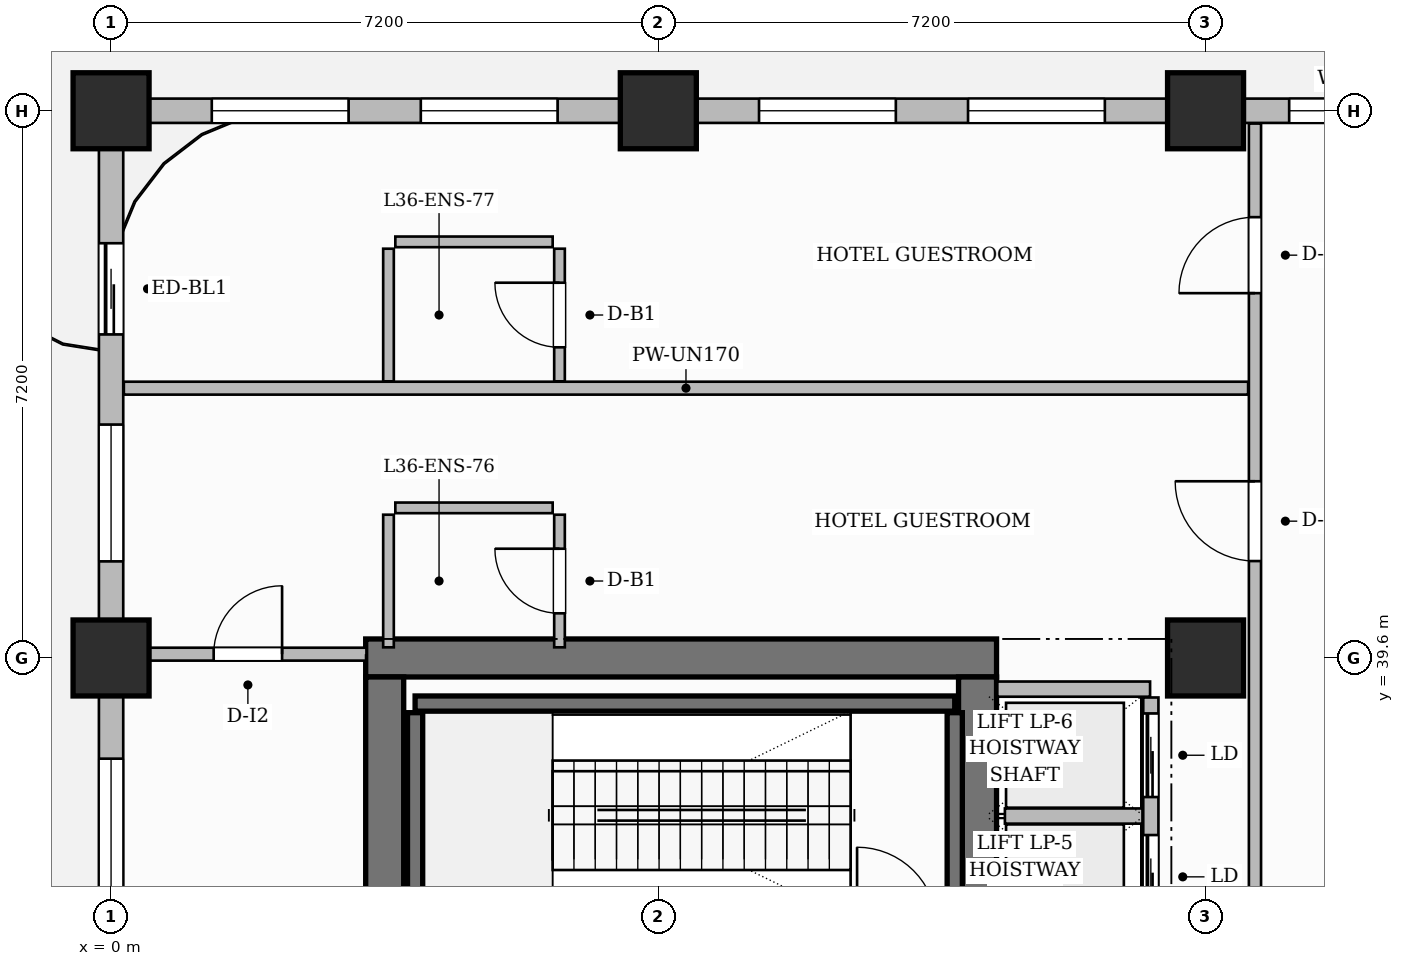
"""IFC4 building model, lengths in metres.
Left out: names, types, materials, properties, quantities, classifications, styles, units other than length and angle.
Written with IfcOpenShell. Run it as: python <this file> out.ifc"""

import sys

from ifc_helpers import new_model, si_unit, direction, frame, frame_2d, origin, origin_2d, place, context, subcontext, project, spatial, rectangle, extrude, source, transform, mapped, element, fill, save


model = new_model("IFC4")
c1 = context("Model", 3, precision=1e-05, world=origin(), true_north=direction((0.0, 1.0)))
c2 = subcontext(c1, "Body", "Model", "MODEL_VIEW")
j1 = project(units=[si_unit("LENGTHUNIT", "METRE"), si_unit("PLANEANGLEUNIT", "RADIAN")], contexts=[c1])
p1 = place(None, origin())
s1 = spatial("IfcSite", under=j1, at=p1, CompositionType="ELEMENT")
p2 = place(p1, origin())
s2 = spatial("IfcBuilding", under=s1, at=p2, CompositionType="ELEMENT")
p3 = place(p2, frame((0.0, 0.0, 145.1)))
s3 = spatial("IfcBuildingStorey", under=s2, at=p3, CompositionType="ELEMENT", Elevation=145.1)
p4 = place(p3, frame((3.35, 39.6, 0.0), z_axis=(0.0, 0.0, 1.0), x_axis=(1.0, 0.0, 0.0)))
e1 = element("IfcWall", 1, at=p4, inside=s3, PredefinedType="SHEAR", context=c2, shape_type="SweptSolid", body=[
    extrude(rectangle(XDim=8.3, YDim=0.5, at=frame_2d((4.15, 0.0))), origin(), (0.0, 0.0, 1.0), 5.2),
])
p5 = place(p3, frame((3.6, 25.45, 0.0), z_axis=(0.0, 0.0, 1.0), x_axis=(0.0, 1.0, 0.0)))
e2 = element("IfcWall", 2, at=p5, inside=s3, PredefinedType="SHEAR", context=c2, shape_type="SweptSolid", body=[
    extrude(rectangle(XDim=13.9, YDim=0.5, at=frame_2d((6.95, 0.0))), origin(), (0.0, 0.0, 1.0), 5.2),
])
p6 = place(p3, frame((11.4, 25.45, 0.0), z_axis=(0.0, 0.0, 1.0), x_axis=(0.0, 1.0, 0.0)))
e3 = element("IfcWall", 3, at=p6, inside=s3, PredefinedType="SHEAR", context=c2, shape_type="SweptSolid", body=[
    extrude(rectangle(XDim=13.9, YDim=0.5, at=frame_2d((6.95, 0.0))), origin(), (0.0, 0.0, 1.0), 5.2),
])
p7 = place(p6, frame((6.52, 0.0, 0.0)))
e4 = element("IfcOpeningElement", 4, at=p7, cuts=e3, PredefinedType="OPENING", context=c2, shape_type="SweptSolid", body=[
    extrude(rectangle(XDim=1.5, YDim=2.2, at=frame_2d((0.75, 1.1))), frame((0.0, 0.26, 0.0), z_axis=(0.0, -1.0, 0.0), x_axis=(1.0, 0.0, 0.0)), (0.0, 0.0, 1.0), 0.52),
])
m1 = source(origin(), c2, "Body", "SweptSolid", [
    extrude(rectangle(XDim=1.0, YDim=1.0, at=origin_2d()), origin(), (0.0, 0.0, 1.0), 5.2),
])
for number, where, z_axis, x_axis in (
    (5, (0.0, 39.6, 0.0), (0.0, 0.0, 1.0), (1.0, 0.0, 0.0)),
    (6, (0.0, 46.8, 0.0), (0.0, 0.0, 1.0), (1.0, 0.0, 0.0)),
    (7, (7.2, 46.8, 0.0), (0.0, 0.0, 1.0), (1.0, 0.0, 0.0)),
    (8, (14.4, 39.6, 0.0), (0.0, 0.0, 1.0), (1.0, 0.0, 0.0)),
    (9, (14.4, 46.8, 0.0), (0.0, 0.0, 1.0), (1.0, 0.0, 0.0)),
):
    element("IfcColumn", number, at=place(p3, frame(where, z_axis=z_axis, x_axis=x_axis)), inside=s3, PredefinedType="COLUMN", context=c2, shape_type="MappedRepresentation", body=[
        mapped(m1, transform((0.0, 0.0, 0.0), scale=1.0)),
    ])
p8 = place(p3, frame((4.0, 39.0, 0.0), z_axis=(0.0, 0.0, 1.0), x_axis=(1.0, 0.0, 0.0)))
e10 = element("IfcWall", 10, at=p8, inside=s3, PredefinedType="SHEAR", context=c2, shape_type="SweptSolid", body=[
    extrude(rectangle(XDim=7.1, YDim=0.2, at=frame_2d((3.55, 0.0))), origin(), (0.0, 0.0, 1.0), 5.2),
])
for number, where, z_axis, x_axis in (
    (11, (4.0, 36.18, 0.0), (0.0, 0.0, 1.0), (0.0, 1.0, 0.0)),
    (12, (11.1, 36.18, 0.0), (0.0, 0.0, 1.0), (0.0, 1.0, 0.0)),
):
    element("IfcWall", number, at=place(p3, frame(where, z_axis=z_axis, x_axis=x_axis)), inside=s3, PredefinedType="SHEAR", context=c2, shape_type="SweptSolid", body=[
        extrude(rectangle(XDim=2.7, YDim=0.2, at=frame_2d((1.35, 0.0))), origin(), (0.0, 0.0, 1.0), 5.2),
    ])
p9 = place(p3, frame((11.66, 39.19, 0.0), z_axis=(0.0, 0.0, 1.0), x_axis=(1.0, 0.0, 0.0)))
e13 = element("IfcWall", 13, at=p9, inside=s3, PredefinedType="PARTITIONING", context=c2, shape_type="SweptSolid", body=[
    extrude(rectangle(XDim=2.01, YDim=0.2, at=frame_2d((1.005, 0.0))), origin(), (0.0, 0.0, 1.0), 4.95),
])
p10 = place(p3, frame((13.68, 34.36, 0.0), z_axis=(0.0, 0.0, 1.0), x_axis=(0.0, 1.0, 0.0)))
e14 = element("IfcWall", 14, at=p10, inside=s3, PredefinedType="PARTITIONING", context=c2, shape_type="SweptSolid", body=[
    extrude(rectangle(XDim=4.72, YDim=0.2, at=frame_2d((2.36, 0.0))), origin(), (0.0, 0.0, 1.0), 4.95),
])
p11 = place(p10, frame((0.21, 0.0, 0.0)))
e15 = element("IfcOpeningElement", 15, at=p11, cuts=e14, PredefinedType="OPENING", context=c2, shape_type="SweptSolid", body=[
    extrude(rectangle(XDim=1.1, YDim=2.2, at=frame_2d((0.55, 1.1))), frame((0.0, 0.11, 0.0), z_axis=(0.0, -1.0, 0.0), x_axis=(1.0, 0.0, 0.0)), (0.0, 0.0, 1.0), 0.22),
])
p12 = place(p10, frame((1.81, 0.0, 0.0)))
e16 = element("IfcOpeningElement", 16, at=p12, cuts=e14, PredefinedType="OPENING", context=c2, shape_type="SweptSolid", body=[
    extrude(rectangle(XDim=1.1, YDim=2.2, at=frame_2d((0.55, 1.1))), frame((0.0, 0.11, 0.0), z_axis=(0.0, -1.0, 0.0), x_axis=(1.0, 0.0, 0.0)), (0.0, 0.0, 1.0), 0.22),
])
p13 = place(p10, frame((3.41, 0.0, 0.0)))
e17 = element("IfcOpeningElement", 17, at=p13, cuts=e14, PredefinedType="OPENING", context=c2, shape_type="SweptSolid", body=[
    extrude(rectangle(XDim=1.1, YDim=2.2, at=frame_2d((0.55, 1.1))), frame((0.0, 0.11, 0.0), z_axis=(0.0, -1.0, 0.0), x_axis=(1.0, 0.0, 0.0)), (0.0, 0.0, 1.0), 0.22),
])
p14 = place(p3, frame((11.76, 37.52, 0.0), z_axis=(0.0, 0.0, 1.0), x_axis=(1.0, 0.0, 0.0)))
e18 = element("IfcWall", 18, at=p14, inside=s3, PredefinedType="PARTITIONING", context=c2, shape_type="SweptSolid", body=[
    extrude(rectangle(XDim=1.81, YDim=0.2, at=frame_2d((0.905, 0.0))), origin(), (0.0, 0.0, 1.0), 4.95),
])
p15 = place(p3, frame((0.24, 39.65, 0.0), z_axis=(0.0, 0.0, 1.0), x_axis=(1.0, 0.0, 0.0)))
e19 = element("IfcWall", 19, at=p15, inside=s3, PredefinedType="PARTITIONING", context=c2, shape_type="SweptSolid", body=[
    extrude(rectangle(XDim=3.12, YDim=0.17, at=frame_2d((1.56, 0.0))), origin(), (0.0, 0.0, 1.0), 4.95),
])
p16 = place(p15, frame((1.11, 0.0, 0.0)))
e20 = element("IfcOpeningElement", 20, at=p16, cuts=e19, PredefinedType="OPENING", context=c2, shape_type="SweptSolid", body=[
    extrude(rectangle(XDim=0.9, YDim=2.15, at=frame_2d((0.45, 1.075))), frame((0.0, 0.095, 0.0), z_axis=(0.0, -1.0, 0.0), x_axis=(1.0, 0.0, 0.0)), (0.0, 0.0, 1.0), 0.19),
])
p17 = place(p3, frame((15.05, 34.34, 0.0), z_axis=(0.0, 0.0, 1.0), x_axis=(0.0, 1.0, 0.0)))
e21 = element("IfcWall", 21, at=p17, inside=s3, PredefinedType="PARTITIONING", context=c2, shape_type="SweptSolid", body=[
    extrude(rectangle(XDim=12.292, YDim=0.16, at=frame_2d((6.146, 0.0))), origin(), (0.0, 0.0, 1.0), 4.95),
])
p18 = place(p17, frame((6.535, 0.0, 0.0)))
e22 = element("IfcOpeningElement", 22, at=p18, cuts=e21, PredefinedType="OPENING", context=c2, shape_type="SweptSolid", body=[
    extrude(rectangle(XDim=1.05, YDim=2.25, at=frame_2d((0.525, 1.125))), frame((0.0, 0.09, 0.0), z_axis=(0.0, -1.0, 0.0), x_axis=(1.0, 0.0, 0.0)), (0.0, 0.0, 1.0), 0.18),
])
p19 = place(p17, frame((10.06, 0.0, 0.0)))
e23 = element("IfcOpeningElement", 23, at=p19, cuts=e21, PredefinedType="OPENING", context=c2, shape_type="SweptSolid", body=[
    extrude(rectangle(XDim=1.0, YDim=2.2, at=frame_2d((0.5, 1.1))), frame((0.0, 0.09, 0.0), z_axis=(0.0, -1.0, 0.0), x_axis=(1.0, 0.0, 0.0)), (0.0, 0.0, 1.0), 0.18),
])
p20 = place(p3, frame((0.168, 43.15, 0.0), z_axis=(0.0, 0.0, 1.0), x_axis=(1.0, 0.0, 0.0)))
e24 = element("IfcWall", 24, at=p20, inside=s3, PredefinedType="PARTITIONING", context=c2, shape_type="SweptSolid", body=[
    extrude(rectangle(XDim=14.792, YDim=0.17, at=frame_2d((7.396, 0.0))), origin(), (0.0, 0.0, 1.0), 4.95),
])
p21 = place(p3, frame((3.65, 39.74, 0.0), z_axis=(0.0, 0.0, 1.0), x_axis=(0.0, 1.0, 0.0)))
e25 = element("IfcWall", 25, at=p21, inside=s3, PredefinedType="PARTITIONING", context=c2, shape_type="SweptSolid", body=[
    extrude(rectangle(XDim=1.745, YDim=0.14, at=frame_2d((0.873, 0.0))), origin(), (0.0, 0.0, 1.0), 4.95),
])
p22 = place(p3, frame((3.74, 41.575, 0.0), z_axis=(0.0, 0.0, 1.0), x_axis=(1.0, 0.0, 0.0)))
e26 = element("IfcWall", 26, at=p22, inside=s3, PredefinedType="PARTITIONING", context=c2, shape_type="SweptSolid", body=[
    extrude(rectangle(XDim=2.07, YDim=0.14, at=frame_2d((1.035, 0.0))), origin(), (0.0, 0.0, 1.0), 4.335),
])
p23 = place(p3, frame((5.9, 39.74, 0.0), z_axis=(0.0, 0.0, 1.0), x_axis=(0.0, 1.0, 0.0)))
e27 = element("IfcWall", 27, at=p23, inside=s3, PredefinedType="PARTITIONING", context=c2, shape_type="SweptSolid", body=[
    extrude(rectangle(XDim=1.745, YDim=0.14, at=frame_2d((0.873, 0.0))), origin(), (0.0, 0.0, 1.0), 4.95),
])
p24 = place(p23, frame((0.448, 0.0, 0.0)))
e28 = element("IfcOpeningElement", 28, at=p24, cuts=e27, PredefinedType="OPENING", context=c2, shape_type="SweptSolid", body=[
    extrude(rectangle(XDim=0.85, YDim=2.1, at=frame_2d((0.425, 1.05))), frame((0.0, 0.08, 0.0), z_axis=(0.0, -1.0, 0.0), x_axis=(1.0, 0.0, 0.0)), (0.0, 0.0, 1.0), 0.16),
])
p25 = place(p3, frame((3.65, 43.24, 0.0), z_axis=(0.0, 0.0, 1.0), x_axis=(0.0, 1.0, 0.0)))
e29 = element("IfcWall", 29, at=p25, inside=s3, PredefinedType="PARTITIONING", context=c2, shape_type="SweptSolid", body=[
    extrude(rectangle(XDim=1.745, YDim=0.14, at=frame_2d((0.873, 0.0))), origin(), (0.0, 0.0, 1.0), 4.95),
])
p26 = place(p3, frame((3.74, 45.075, 0.0), z_axis=(0.0, 0.0, 1.0), x_axis=(1.0, 0.0, 0.0)))
e30 = element("IfcWall", 30, at=p26, inside=s3, PredefinedType="PARTITIONING", context=c2, shape_type="SweptSolid", body=[
    extrude(rectangle(XDim=2.07, YDim=0.14, at=frame_2d((1.035, 0.0))), origin(), (0.0, 0.0, 1.0), 4.95),
])
p27 = place(p3, frame((5.9, 43.24, 0.0), z_axis=(0.0, 0.0, 1.0), x_axis=(0.0, 1.0, 0.0)))
e31 = element("IfcWall", 31, at=p27, inside=s3, PredefinedType="PARTITIONING", context=c2, shape_type="SweptSolid", body=[
    extrude(rectangle(XDim=1.745, YDim=0.14, at=frame_2d((0.873, 0.0))), origin(), (0.0, 0.0, 1.0), 4.95),
])
p28 = place(p27, frame((0.448, 0.0, 0.0)))
e32 = element("IfcOpeningElement", 32, at=p28, cuts=e31, PredefinedType="OPENING", context=c2, shape_type="SweptSolid", body=[
    extrude(rectangle(XDim=0.85, YDim=2.1, at=frame_2d((0.425, 1.05))), frame((0.0, 0.08, 0.0), z_axis=(0.0, -1.0, 0.0), x_axis=(1.0, 0.0, 0.0)), (0.0, 0.0, 1.0), 0.16),
])
p29 = place(p3, frame((0.0, 25.25, 0.0), z_axis=(0.0, 0.0, 1.0), x_axis=(0.0, 1.0, 0.0)))
e33 = element("IfcWall", 33, at=p29, inside=s3, PredefinedType="SOLIDWALL", context=c2, shape_type="SweptSolid", body=[
    extrude(rectangle(XDim=21.5, YDim=0.32, at=frame_2d((10.75, 0.0))), origin(), (0.0, 0.0, 1.0), 4.335),
])
p30 = place(p29, frame((18.607, 0.0, 0.0)))
e34 = element("IfcOpeningElement", 34, at=p30, cuts=e33, PredefinedType="OPENING", context=c2, shape_type="SweptSolid", body=[
    extrude(rectangle(XDim=1.2, YDim=2.2, at=frame_2d((0.6, 1.1))), frame((0.0, 0.17, 0.0), z_axis=(0.0, -1.0, 0.0), x_axis=(1.0, 0.0, 0.0)), (0.0, 0.0, 1.0), 0.34),
])
p31 = place(p29, frame((0.8, 0.0, 0.0)))
e35 = element("IfcOpeningElement", 35, at=p31, cuts=e33, PredefinedType="OPENING", context=c2, shape_type="SweptSolid", body=[
    extrude(rectangle(XDim=1.2, YDim=2.2, at=frame_2d((0.6, 1.1))), frame((0.0, 0.17, 0.0), z_axis=(0.0, -1.0, 0.0), x_axis=(1.0, 0.0, 0.0)), (0.0, 0.0, 1.0), 0.34),
])
p32 = place(p29, frame((3.425, 0.0, 0.8)))
e36 = element("IfcOpeningElement", 36, at=p32, cuts=e33, PredefinedType="OPENING", context=c2, shape_type="SweptSolid", body=[
    extrude(rectangle(XDim=1.8, YDim=1.85, at=frame_2d((0.9, 0.925))), frame((0.0, 0.17, 0.0), z_axis=(0.0, -1.0, 0.0), x_axis=(1.0, 0.0, 0.0)), (0.0, 0.0, 1.0), 0.34),
])
p33 = place(p29, frame((8.475, 0.0, 0.8)))
e37 = element("IfcOpeningElement", 37, at=p33, cuts=e33, PredefinedType="OPENING", context=c2, shape_type="SweptSolid", body=[
    extrude(rectangle(XDim=1.8, YDim=1.85, at=frame_2d((0.9, 0.925))), frame((0.0, 0.17, 0.0), z_axis=(0.0, -1.0, 0.0), x_axis=(1.0, 0.0, 0.0)), (0.0, 0.0, 1.0), 0.34),
])
p34 = place(p29, frame((11.225, 0.0, 0.8)))
e38 = element("IfcOpeningElement", 38, at=p34, cuts=e33, PredefinedType="OPENING", context=c2, shape_type="SweptSolid", body=[
    extrude(rectangle(XDim=1.8, YDim=1.85, at=frame_2d((0.9, 0.925))), frame((0.0, 0.17, 0.0), z_axis=(0.0, -1.0, 0.0), x_axis=(1.0, 0.0, 0.0)), (0.0, 0.0, 1.0), 0.34),
])
p35 = place(p29, frame((15.621, 0.0, 0.8)))
e39 = element("IfcOpeningElement", 39, at=p35, cuts=e33, PredefinedType="OPENING", context=c2, shape_type="SweptSolid", body=[
    extrude(rectangle(XDim=1.8, YDim=1.85, at=frame_2d((0.9, 0.925))), frame((0.0, 0.17, 0.0), z_axis=(0.0, -1.0, 0.0), x_axis=(1.0, 0.0, 0.0)), (0.0, 0.0, 1.0), 0.34),
])
p36 = place(p3, frame((0.0, 46.8, 0.0), z_axis=(0.0, 0.0, 1.0), x_axis=(1.0, 0.0, 0.0)))
e40 = element("IfcWall", 40, at=p36, inside=s3, PredefinedType="SOLIDWALL", context=c2, shape_type="SweptSolid", body=[
    extrude(rectangle(XDim=18.0, YDim=0.32, at=frame_2d((9.0, 0.0))), origin(), (0.0, 0.0, 1.0), 4.335),
])
p37 = place(p36, frame((1.325, 0.0, 0.8)))
e41 = element("IfcOpeningElement", 41, at=p37, cuts=e40, PredefinedType="OPENING", context=c2, shape_type="SweptSolid", body=[
    extrude(rectangle(XDim=1.8, YDim=1.85, at=frame_2d((0.9, 0.925))), frame((0.0, 0.17, 0.0), z_axis=(0.0, -1.0, 0.0), x_axis=(1.0, 0.0, 0.0)), (0.0, 0.0, 1.0), 0.34),
])
p38 = place(p36, frame((4.075, 0.0, 0.8)))
e42 = element("IfcOpeningElement", 42, at=p38, cuts=e40, PredefinedType="OPENING", context=c2, shape_type="SweptSolid", body=[
    extrude(rectangle(XDim=1.8, YDim=1.85, at=frame_2d((0.9, 0.925))), frame((0.0, 0.17, 0.0), z_axis=(0.0, -1.0, 0.0), x_axis=(1.0, 0.0, 0.0)), (0.0, 0.0, 1.0), 0.34),
])
p39 = place(p36, frame((8.525, 0.0, 0.8)))
e43 = element("IfcOpeningElement", 43, at=p39, cuts=e40, PredefinedType="OPENING", context=c2, shape_type="SweptSolid", body=[
    extrude(rectangle(XDim=1.8, YDim=1.85, at=frame_2d((0.9, 0.925))), frame((0.0, 0.17, 0.0), z_axis=(0.0, -1.0, 0.0), x_axis=(1.0, 0.0, 0.0)), (0.0, 0.0, 1.0), 0.34),
])
p40 = place(p36, frame((11.275, 0.0, 0.8)))
e44 = element("IfcOpeningElement", 44, at=p40, cuts=e40, PredefinedType="OPENING", context=c2, shape_type="SweptSolid", body=[
    extrude(rectangle(XDim=1.8, YDim=1.85, at=frame_2d((0.9, 0.925))), frame((0.0, 0.17, 0.0), z_axis=(0.0, -1.0, 0.0), x_axis=(1.0, 0.0, 0.0)), (0.0, 0.0, 1.0), 0.34),
])
p41 = place(p36, frame((15.5, 0.0, 0.8)))
e45 = element("IfcOpeningElement", 45, at=p41, cuts=e40, PredefinedType="OPENING", context=c2, shape_type="SweptSolid", body=[
    extrude(rectangle(XDim=1.4, YDim=1.85, at=frame_2d((0.7, 0.925))), frame((0.0, 0.17, 0.0), z_axis=(0.0, -1.0, 0.0), x_axis=(1.0, 0.0, 0.0)), (0.0, 0.0, 1.0), 0.34),
])
m2 = source(origin(), c2, "Body", "SweptSolid", [
    extrude(rectangle(XDim=0.9, YDim=2.15, at=frame_2d((0.45, 1.075))), frame((0.0, 0.025, 0.0), z_axis=(0.0, -1.0, 0.0), x_axis=(1.0, 0.0, 0.0)), (0.0, 0.0, 1.0), 0.05),
])
p42 = place(p16, origin())
e46 = element("IfcDoor", 46, at=p42, inside=s3, OperationType="SINGLE_SWING_RIGHT", PredefinedType="DOOR", context=c2, shape_type="MappedRepresentation", body=[
    mapped(m2, transform((0.0, 0.0, 0.0), scale=1.0)),
])
fill(e20, e46)
m3 = source(origin(), c2, "Body", "SweptSolid", [
    extrude(rectangle(XDim=0.85, YDim=2.1, at=frame_2d((0.425, 1.05))), frame((0.0, 0.025, 0.0), z_axis=(0.0, -1.0, 0.0), x_axis=(1.0, 0.0, 0.0)), (0.0, 0.0, 1.0), 0.05),
])
p43 = place(p24, origin())
e47 = element("IfcDoor", 47, at=p43, inside=s3, OperationType="SINGLE_SWING_RIGHT", PredefinedType="DOOR", context=c2, shape_type="MappedRepresentation", body=[
    mapped(m3, transform((0.0, 0.0, 0.0), scale=1.0)),
])
fill(e28, e47)
m4 = source(origin(), c2, "Body", "SweptSolid", [
    extrude(rectangle(XDim=1.05, YDim=2.25, at=frame_2d((0.525, 1.125))), frame((0.0, 0.025, 0.0), z_axis=(0.0, -1.0, 0.0), x_axis=(1.0, 0.0, 0.0)), (0.0, 0.0, 1.0), 0.05),
])
p44 = place(p18, origin())
e48 = element("IfcDoor", 48, at=p44, inside=s3, OperationType="SINGLE_SWING_RIGHT", PredefinedType="DOOR", context=c2, shape_type="MappedRepresentation", body=[
    mapped(m4, transform((0.0, 0.0, 0.0), scale=1.0)),
])
fill(e22, e48)
p45 = place(p28, origin())
e49 = element("IfcDoor", 49, at=p45, inside=s3, OperationType="SINGLE_SWING_RIGHT", PredefinedType="DOOR", context=c2, shape_type="MappedRepresentation", body=[
    mapped(m3, transform((0.0, 0.0, 0.0), scale=1.0)),
])
fill(e32, e49)
m5 = source(origin(), c2, "Body", "SweptSolid", [
    extrude(rectangle(XDim=1.0, YDim=2.2, at=frame_2d((0.5, 1.1))), frame((0.0, 0.025, 0.0), z_axis=(0.0, -1.0, 0.0), x_axis=(1.0, 0.0, 0.0)), (0.0, 0.0, 1.0), 0.05),
])
p46 = place(p19, origin())
e50 = element("IfcDoor", 50, at=p46, inside=s3, OperationType="SINGLE_SWING_LEFT", PredefinedType="DOOR", context=c2, shape_type="MappedRepresentation", body=[
    mapped(m5, transform((0.0, 0.0, 0.0), scale=1.0)),
])
fill(e23, e50)
m6 = source(origin(), c2, "Body", "SweptSolid", [
    extrude(rectangle(XDim=1.1, YDim=2.2, at=frame_2d((0.55, 1.1))), frame((0.0, 0.025, 0.0), z_axis=(0.0, -1.0, 0.0), x_axis=(1.0, 0.0, 0.0)), (0.0, 0.0, 1.0), 0.05),
])
p47 = place(p12, origin())
e51 = element("IfcDoor", 51, at=p47, inside=s3, OperationType="SLIDING_TO_LEFT", PredefinedType="DOOR", context=c2, shape_type="MappedRepresentation", body=[
    mapped(m6, transform((0.0, 0.0, 0.0), scale=1.0)),
])
fill(e16, e51)
p48 = place(p13, origin())
e52 = element("IfcDoor", 52, at=p48, inside=s3, OperationType="SLIDING_TO_LEFT", PredefinedType="DOOR", context=c2, shape_type="MappedRepresentation", body=[
    mapped(m6, transform((0.0, 0.0, 0.0), scale=1.0)),
])
fill(e17, e52)
m7 = source(origin(), c2, "Body", "SweptSolid", [
    extrude(rectangle(XDim=1.2, YDim=2.2, at=frame_2d((0.6, 1.1))), frame((0.0, 0.025, 0.0), z_axis=(0.0, -1.0, 0.0), x_axis=(1.0, 0.0, 0.0)), (0.0, 0.0, 1.0), 0.05),
])
p49 = place(p30, origin())
e53 = element("IfcDoor", 53, at=p49, inside=s3, OperationType="SLIDING_TO_LEFT", PredefinedType="DOOR", context=c2, shape_type="MappedRepresentation", body=[
    mapped(m7, transform((0.0, 0.0, 0.0), scale=1.0)),
])
fill(e34, e53)
m8 = source(origin(), c2, "Body", "SweptSolid", [
    extrude(rectangle(XDim=1.8, YDim=1.85, at=frame_2d((0.9, 0.925))), frame((0.0, 0.03, 0.0), z_axis=(0.0, -1.0, 0.0), x_axis=(1.0, 0.0, 0.0)), (0.0, 0.0, 1.0), 0.06),
])
p50 = place(p34, origin())
e54 = element("IfcWindow", 54, at=p50, inside=s3, PartitioningType="DOUBLE_PANEL_VERTICAL", PredefinedType="WINDOW", context=c2, shape_type="MappedRepresentation", body=[
    mapped(m8, transform((0.0, 0.0, 0.0), scale=1.0)),
])
fill(e38, e54)
p51 = place(p35, origin())
e55 = element("IfcWindow", 55, at=p51, inside=s3, PartitioningType="DOUBLE_PANEL_VERTICAL", PredefinedType="WINDOW", context=c2, shape_type="MappedRepresentation", body=[
    mapped(m8, transform((0.0, 0.0, 0.0), scale=1.0)),
])
fill(e39, e55)
p52 = place(p37, origin())
e56 = element("IfcWindow", 56, at=p52, inside=s3, PartitioningType="DOUBLE_PANEL_VERTICAL", PredefinedType="WINDOW", context=c2, shape_type="MappedRepresentation", body=[
    mapped(m8, transform((0.0, 0.0, 0.0), scale=1.0)),
])
fill(e41, e56)
p53 = place(p38, origin())
e57 = element("IfcWindow", 57, at=p53, inside=s3, PartitioningType="DOUBLE_PANEL_VERTICAL", PredefinedType="WINDOW", context=c2, shape_type="MappedRepresentation", body=[
    mapped(m8, transform((0.0, 0.0, 0.0), scale=1.0)),
])
fill(e42, e57)
p54 = place(p39, origin())
e58 = element("IfcWindow", 58, at=p54, inside=s3, PartitioningType="DOUBLE_PANEL_VERTICAL", PredefinedType="WINDOW", context=c2, shape_type="MappedRepresentation", body=[
    mapped(m8, transform((0.0, 0.0, 0.0), scale=1.0)),
])
fill(e43, e58)
p55 = place(p40, origin())
e59 = element("IfcWindow", 59, at=p55, inside=s3, PartitioningType="DOUBLE_PANEL_VERTICAL", PredefinedType="WINDOW", context=c2, shape_type="MappedRepresentation", body=[
    mapped(m8, transform((0.0, 0.0, 0.0), scale=1.0)),
])
fill(e44, e59)
m9 = source(origin(), c2, "Body", "SweptSolid", [
    extrude(rectangle(XDim=1.4, YDim=1.85, at=frame_2d((0.7, 0.925))), frame((0.0, 0.03, 0.0), z_axis=(0.0, -1.0, 0.0), x_axis=(1.0, 0.0, 0.0)), (0.0, 0.0, 1.0), 0.06),
])
p56 = place(p41, origin())
e60 = element("IfcWindow", 60, at=p56, inside=s3, PartitioningType="SINGLE_PANEL", PredefinedType="WINDOW", context=c2, shape_type="MappedRepresentation", body=[
    mapped(m9, transform((0.0, 0.0, 0.0), scale=1.0)),
])
fill(e45, e60)
save(model, sys.argv[1])
